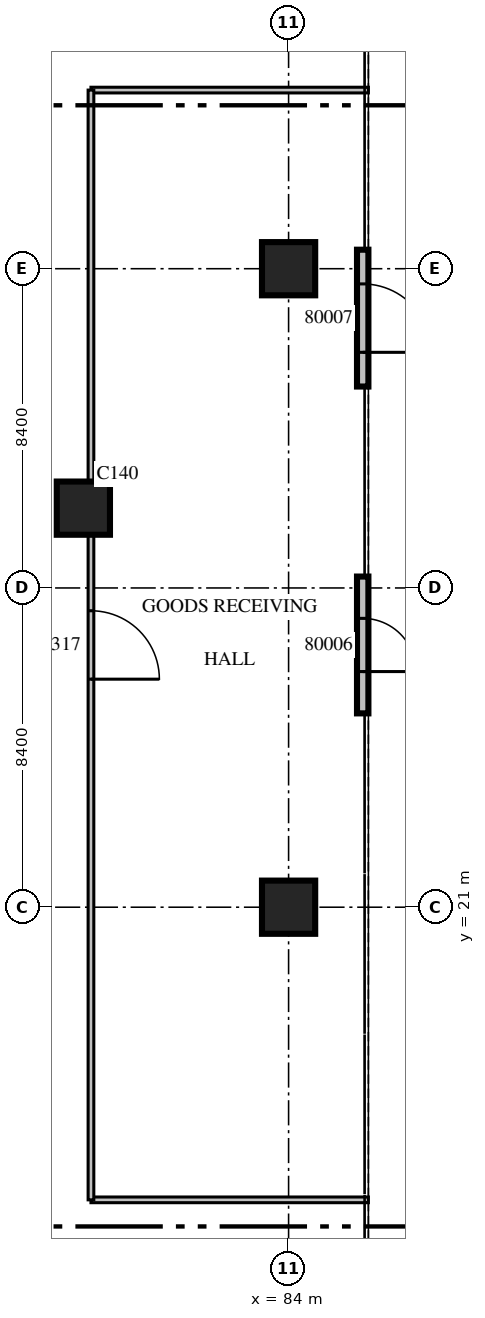
"""IFC4 building model, lengths in metres.
Left out: names, types, materials, properties, quantities, classifications, styles, units other than length and angle.
Written with IfcOpenShell. Run it as: python <this file> out.ifc"""

import sys

from ifc_helpers import new_model, si_unit, direction, frame, frame_2d, origin, origin_2d, place, context, subcontext, project, spatial, rectangle, extrude, source, transform, mapped, element, fill, save


model = new_model("IFC4")
c1 = context("Model", 3, precision=1e-05, world=origin(), true_north=direction((0.0, 1.0)))
c2 = subcontext(c1, "Body", "Model", "MODEL_VIEW")
j1 = project(units=[si_unit("LENGTHUNIT", "METRE"), si_unit("PLANEANGLEUNIT", "RADIAN")], contexts=[c1])
p1 = place(None, origin())
s1 = spatial("IfcSite", under=j1, at=p1, CompositionType="ELEMENT")
p2 = place(p1, origin())
s2 = spatial("IfcBuilding", under=s1, at=p2, CompositionType="ELEMENT")
p3 = place(p2, origin())
s3 = spatial("IfcBuildingStorey", under=s2, at=p3, CompositionType="ELEMENT", Elevation=0.0)
m1 = source(origin(), c2, "Body", "SweptSolid", [
    extrude(rectangle(XDim=1.4, YDim=1.4, at=origin_2d()), origin(), (0.0, 0.0, 1.0), 7.5),
])
for number, where, z_axis, x_axis in (
    (1, (78.6, 31.5, 0.0), (0.0, 0.0, 1.0), (1.0, 0.0, 0.0)),
    (2, (84.0, 21.0, 0.0), (0.0, 0.0, 1.0), (1.0, 0.0, 0.0)),
    (3, (84.0, 37.8, 0.0), (0.0, 0.0, 1.0), (1.0, 0.0, 0.0)),
):
    element("IfcColumn", number, at=place(p3, frame(where, z_axis=z_axis, x_axis=x_axis)), inside=s3, PredefinedType="COLUMN", context=c2, shape_type="MappedRepresentation", body=[
        mapped(m1, transform((0.0, 0.0, 0.0), scale=1.0)),
    ])
m2 = source(origin(), c2, "Body", "SweptSolid", [
    extrude(rectangle(XDim=3.6, YDim=0.3, at=frame_2d((1.8, 0.0))), origin(), (0.0, 0.0, 1.0), 6.9),
])
p4 = place(p3, frame((85.95, 26.1, 0.0), z_axis=(0.0, 0.0, 1.0), x_axis=(0.0, 1.0, 0.0)))
e4 = element("IfcWall", 4, at=p4, inside=s3, PredefinedType="STANDARD", context=c2, shape_type="MappedRepresentation", body=[
    mapped(m2, transform((0.0, 0.0, 0.0), scale=1.0)),
])
p5 = place(p4, frame((1.1, 0.0, 0.0)))
e5 = element("IfcOpeningElement", 5, at=p5, cuts=e4, PredefinedType="OPENING", context=c2, shape_type="SweptSolid", body=[
    extrude(rectangle(XDim=1.4, YDim=2.4, at=frame_2d((0.7, 1.2))), frame((0.0, 0.16, 0.0), z_axis=(0.0, -1.0, 0.0), x_axis=(1.0, 0.0, 0.0)), (0.0, 0.0, 1.0), 0.32),
])
p6 = place(p3, frame((85.95, 34.7, 0.0), z_axis=(0.0, 0.0, 1.0), x_axis=(0.0, 1.0, 0.0)))
e6 = element("IfcWall", 6, at=p6, inside=s3, PredefinedType="STANDARD", context=c2, shape_type="MappedRepresentation", body=[
    mapped(m2, transform((0.0, 0.0, 0.0), scale=1.0)),
])
m3 = source(origin(), c2, "Body", "SweptSolid", [
    extrude(rectangle(XDim=1.8, YDim=2.4, at=frame_2d((0.9, 1.2))), frame((0.0, 0.16, 0.0), z_axis=(0.0, -1.0, 0.0), x_axis=(1.0, 0.0, 0.0)), (0.0, 0.0, 1.0), 0.32),
])
p7 = place(p6, frame((0.9, 0.0, 0.0)))
e7 = element("IfcOpeningElement", 7, at=p7, cuts=e6, PredefinedType="OPENING", context=c2, shape_type="MappedRepresentation", body=[
    mapped(m3, transform((0.0, 0.0, 0.0), scale=1.0)),
])
m4 = source(origin(), c2, "Body", "SweptSolid", [
    extrude(rectangle(XDim=7.3, YDim=0.15, at=frame_2d((3.65, 0.0))), origin(), (0.0, 0.0, 1.0), 6.9),
])
for number, where, z_axis, x_axis in (
    (8, (78.8, 13.3, 0.0), (0.0, 0.0, 1.0), (1.0, 0.0, 0.0)),
    (9, (78.8, 42.5, 0.0), (0.0, 0.0, 1.0), (1.0, 0.0, 0.0)),
):
    element("IfcWall", number, at=place(p3, frame(where, z_axis=z_axis, x_axis=x_axis)), inside=s3, PredefinedType="PARTITIONING", context=c2, shape_type="MappedRepresentation", body=[
        mapped(m4, transform((0.0, 0.0, 0.0), scale=1.0)),
    ])
m5 = source(origin(), c2, "Body", "SweptSolid", [
    extrude(rectangle(XDim=29.2, YDim=0.15, at=frame_2d((14.6, 0.0))), origin(), (0.0, 0.0, 1.0), 6.9),
])
p8 = place(p3, frame((78.8, 13.3, 0.0), z_axis=(0.0, 0.0, 1.0), x_axis=(0.0, 1.0, 0.0)))
e10 = element("IfcWall", 10, at=p8, inside=s3, PredefinedType="PARTITIONING", context=c2, shape_type="MappedRepresentation", body=[
    mapped(m5, transform((0.0, 0.0, 0.0), scale=1.0)),
])
m6 = source(origin(), c2, "Body", "SweptSolid", [
    extrude(rectangle(XDim=1.8, YDim=2.1, at=frame_2d((0.9, 1.05))), frame((0.0, 0.085, 0.0), z_axis=(0.0, -1.0, 0.0), x_axis=(1.0, 0.0, 0.0)), (0.0, 0.0, 1.0), 0.17),
])
p9 = place(p8, frame((13.7, 0.0, 0.0)))
e11 = element("IfcOpeningElement", 11, at=p9, cuts=e10, PredefinedType="OPENING", context=c2, shape_type="MappedRepresentation", body=[
    mapped(m6, transform((0.0, 0.0, 0.0), scale=1.0)),
])
p10 = place(p5, origin())
e12 = element("IfcDoor", 12, at=p10, inside=s3, OperationType="DOUBLE_DOOR_SINGLE_SWING", PredefinedType="DOOR", context=c2, shape_type="SweptSolid", body=[
    extrude(rectangle(XDim=1.4, YDim=2.4, at=frame_2d((0.7, 1.2))), frame((0.0, 0.025, 0.0), z_axis=(0.0, -1.0, 0.0), x_axis=(1.0, 0.0, 0.0)), (0.0, 0.0, 1.0), 0.05),
])
fill(e5, e12)
m7 = source(origin(), c2, "Body", "SweptSolid", [
    extrude(rectangle(XDim=1.8, YDim=2.4, at=frame_2d((0.9, 1.2))), frame((0.0, 0.025, 0.0), z_axis=(0.0, -1.0, 0.0), x_axis=(1.0, 0.0, 0.0)), (0.0, 0.0, 1.0), 0.05),
])
p11 = place(p7, origin())
e13 = element("IfcDoor", 13, at=p11, inside=s3, OperationType="DOUBLE_DOOR_SINGLE_SWING", PredefinedType="DOOR", context=c2, shape_type="MappedRepresentation", body=[
    mapped(m7, transform((0.0, 0.0, 0.0), scale=1.0)),
])
fill(e7, e13)
m8 = source(origin(), c2, "Body", "SweptSolid", [
    extrude(rectangle(XDim=1.8, YDim=2.1, at=frame_2d((0.9, 1.05))), frame((0.0, 0.025, 0.0), z_axis=(0.0, -1.0, 0.0), x_axis=(1.0, 0.0, 0.0)), (0.0, 0.0, 1.0), 0.05),
])
p12 = place(p9, origin())
e14 = element("IfcDoor", 14, at=p12, inside=s3, OperationType="DOUBLE_DOOR_SINGLE_SWING", PredefinedType="DOOR", context=c2, shape_type="MappedRepresentation", body=[
    mapped(m8, transform((0.0, 0.0, 0.0), scale=1.0)),
])
fill(e11, e14)
save(model, sys.argv[1])
